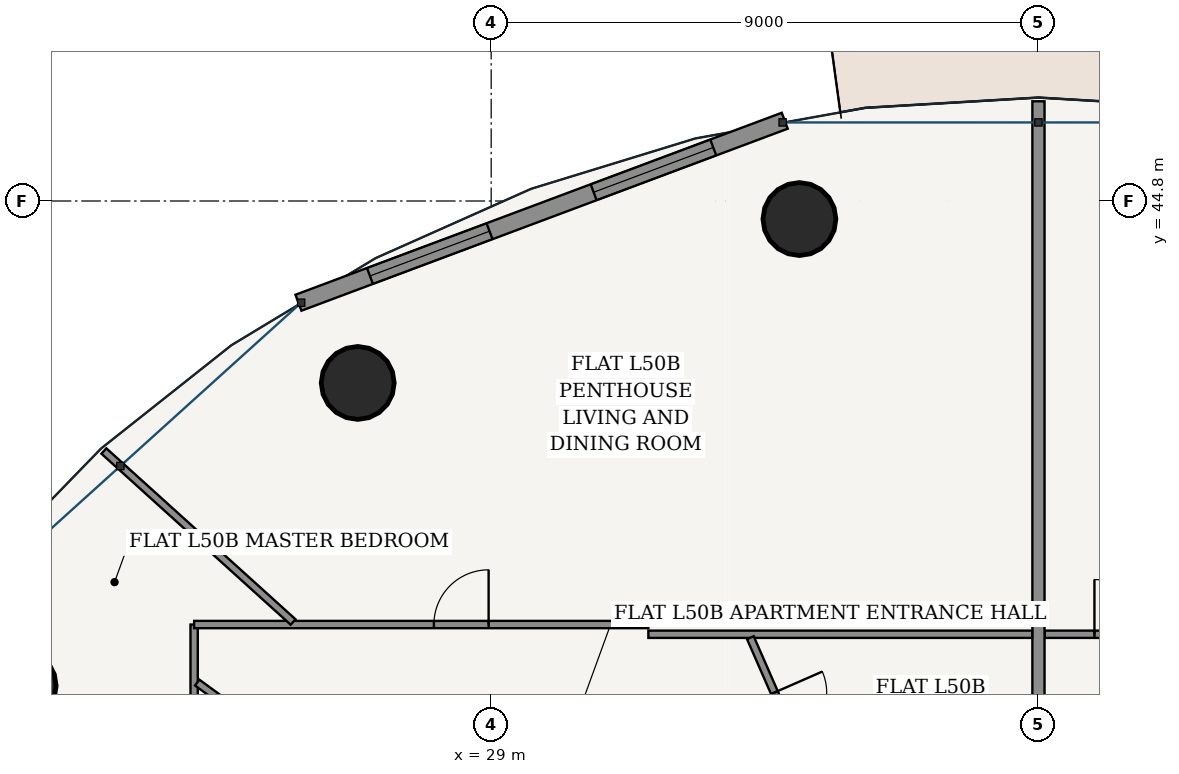
"""IFC4 building model, lengths in metres.
Left out: names, types, materials, properties, quantities, classifications, styles, units other than length and angle.
Written with IfcOpenShell. Run it as: python <this file> out.ifc"""

import sys

from ifc_helpers import new_model, si_unit, direction, frame, frame_2d, origin, origin_2d, place, context, subcontext, project, spatial, rectangle, hollow_circle, extrude, source, transform, mapped, element, fill, save


model = new_model("IFC4")
c1 = context("Model", 3, precision=1e-05, world=origin(), true_north=direction((-0.2419218956, 0.970295726276)))
c2 = subcontext(c1, "Body", "Model", "MODEL_VIEW")
j1 = project(units=[si_unit("LENGTHUNIT", "METRE"), si_unit("PLANEANGLEUNIT", "RADIAN")], contexts=[c1])
p1 = place(None, origin())
s1 = spatial("IfcSite", under=j1, at=p1, CompositionType="ELEMENT")
p2 = place(p1, origin())
s2 = spatial("IfcBuilding", under=s1, at=p2, CompositionType="ELEMENT")
p3 = place(p2, frame((0.0, 0.0, 191.2)))
s3 = spatial("IfcBuildingStorey", under=s2, at=p3, CompositionType="ELEMENT", Elevation=191.2)
for number, where, z_axis, x_axis in (
    (1, (34.069, 44.503, 0.0), (0.0, 0.0, 1.0), (1.0, 0.0, 0.0)),
    (2, (26.805, 41.808, 0.0), (0.0, 0.0, 1.0), (1.0, 0.0, 0.0)),
    (3, (21.246, 36.828, 0.0), (0.0, 0.0, 1.0), (1.0, 0.0, 0.0)),
):
    element("IfcColumn", number, at=place(p3, frame(where, z_axis=z_axis, x_axis=x_axis)), inside=s3, PredefinedType="COLUMN", context=c2, shape_type="SweptSolid", body=[
        extrude(hollow_circle(Radius=0.6, WallThickness=0.038, at=origin_2d()), origin(), (0.0, 0.0, 1.0), 3.7),
    ])
p4 = place(p3, frame((33.828, 46.12, 0.0), z_axis=(0.0, 0.0, 1.0), x_axis=(-0.936556918375, -0.350515532672, 0.0)))
e4 = element("IfcWall", 4, at=p4, inside=s3, PredefinedType="SOLIDWALL", context=c2, shape_type="SweptSolid", body=[
    extrude(rectangle(XDim=8.539, YDim=0.28, at=frame_2d((4.27, 0.0))), origin(), (0.0, 0.0, 1.0), 3.435),
])
p5 = place(p4, frame((1.256, 0.0, 0.85)))
e5 = element("IfcOpeningElement", 5, at=p5, cuts=e4, PredefinedType="OPENING", context=c2, shape_type="SweptSolid", body=[
    extrude(rectangle(XDim=2.1, YDim=1.95, at=frame_2d((1.05, 0.975))), frame((0.0, 0.15, 0.0), z_axis=(0.0, -1.0, 0.0), x_axis=(1.0, 0.0, 0.0)), (0.0, 0.0, 1.0), 0.3),
])
p6 = place(p4, frame((5.184, 0.0, 0.85)))
e6 = element("IfcOpeningElement", 6, at=p6, cuts=e4, PredefinedType="OPENING", context=c2, shape_type="SweptSolid", body=[
    extrude(rectangle(XDim=2.1, YDim=1.95, at=frame_2d((1.05, 0.975))), frame((0.0, 0.15, 0.0), z_axis=(0.0, -1.0, 0.0), x_axis=(1.0, 0.0, 0.0)), (0.0, 0.0, 1.0), 0.3),
])
p7 = place(p3, frame((38.102, 37.675, 0.0), z_axis=(0.0, 0.0, 1.0), x_axis=(1.0, 0.0, 0.0)))
e7 = element("IfcWall", 7, at=p7, inside=s3, PredefinedType="PARTITIONING", context=c2, shape_type="SweptSolid", body=[
    extrude(rectangle(XDim=6.313, YDim=0.12, at=frame_2d((3.156, 0.0))), origin(), (0.0, 0.0, 1.0), 2.951),
])
p8 = place(p7, frame((0.819, 0.0, 0.0)))
e8 = element("IfcOpeningElement", 8, at=p8, cuts=e7, PredefinedType="OPENING", context=c2, shape_type="SweptSolid", body=[
    extrude(rectangle(XDim=0.9, YDim=2.15, at=frame_2d((0.45, 1.075))), frame((0.0, 0.07, 0.0), z_axis=(0.0, -1.0, 0.0), x_axis=(1.0, 0.0, 0.0)), (0.0, 0.0, 1.0), 0.14),
])
p9 = place(p3, frame((38.0, 35.027, 0.0), z_axis=(0.0, 0.0, 1.0), x_axis=(0.0, 1.0, 0.0)))
e9 = element("IfcWall", 9, at=p9, inside=s3, PredefinedType="PARTITIONING", context=c2, shape_type="SweptSolid", body=[
    extrude(rectangle(XDim=11.413, YDim=0.2, at=frame_2d((5.707, 0.0))), origin(), (0.0, 0.0, 1.0), 2.52),
])
p10 = place(p3, frame((24.115, 24.406, 0.0), z_axis=(0.0, 0.0, 1.0), x_axis=(0.0, 1.0, 0.0)))
e10 = element("IfcWall", 10, at=p10, inside=s3, PredefinedType="PARTITIONING", context=c2, shape_type="SweptSolid", body=[
    extrude(rectangle(XDim=13.429, YDim=0.12, at=frame_2d((6.714, 0.0))), origin(), (0.0, 0.0, 1.0), 2.951),
])
p11 = place(p10, frame((9.641, 0.0, 0.0)))
e11 = element("IfcOpeningElement", 11, at=p11, cuts=e10, PredefinedType="OPENING", context=c2, shape_type="SweptSolid", body=[
    extrude(rectangle(XDim=0.9, YDim=2.15, at=frame_2d((0.45, 1.075))), frame((0.0, 0.07, 0.0), z_axis=(0.0, -1.0, 0.0), x_axis=(1.0, 0.0, 0.0)), (0.0, 0.0, 1.0), 0.14),
])
p12 = place(p3, frame((24.115, 37.835, 0.0), z_axis=(0.0, 0.0, 1.0), x_axis=(1.0, 0.0, 0.0)))
e12 = element("IfcWall", 12, at=p12, inside=s3, PredefinedType="PARTITIONING", context=c2, shape_type="SweptSolid", body=[
    extrude(rectangle(XDim=7.47, YDim=0.12, at=frame_2d((3.735, 0.0))), origin(), (0.0, 0.0, 1.0), 2.951),
])
p13 = place(p12, frame((3.943, 0.0, 0.0)))
e13 = element("IfcOpeningElement", 13, at=p13, cuts=e12, PredefinedType="OPENING", context=c2, shape_type="SweptSolid", body=[
    extrude(rectangle(XDim=0.9, YDim=2.15, at=frame_2d((0.45, 1.075))), frame((0.0, 0.07, 0.0), z_axis=(0.0, -1.0, 0.0), x_axis=(1.0, 0.0, 0.0)), (0.0, 0.0, 1.0), 0.14),
])
p14 = place(p3, frame((31.585, 37.675, 0.0), z_axis=(0.0, 0.0, 1.0), x_axis=(1.0, 0.0, 0.0)))
e14 = element("IfcWall", 14, at=p14, inside=s3, PredefinedType="PARTITIONING", context=c2, shape_type="SweptSolid", body=[
    extrude(rectangle(XDim=6.313, YDim=0.12, at=frame_2d((3.156, 0.0))), origin(), (0.0, 0.0, 1.0), 2.951),
])
p15 = place(p3, frame((25.743, 37.876, 0.0), z_axis=(0.0, 0.0, 1.0), x_axis=(-0.741943837234, 0.670462036502, 0.0)))
e15 = element("IfcWall", 15, at=p15, inside=s3, PredefinedType="PARTITIONING", context=c2, shape_type="SweptSolid", body=[
    extrude(rectangle(XDim=4.194, YDim=0.12, at=frame_2d((2.097, 0.0))), origin(), (0.0, 0.0, 1.0), 2.951),
])
p16 = place(p3, frame((34.397, 35.027, 0.0), z_axis=(0.0, 0.0, 1.0), x_axis=(-0.401135725485, 0.916018629581, 0.0)))
e16 = element("IfcWall", 16, at=p16, inside=s3, PredefinedType="PARTITIONING", context=c2, shape_type="SweptSolid", body=[
    extrude(rectangle(XDim=2.829, YDim=0.12, at=frame_2d((1.415, 0.0))), origin(), (0.0, 0.0, 1.0), 3.435),
])
p17 = place(p16, frame((0.985, 0.0, 0.0)))
e17 = element("IfcOpeningElement", 17, at=p17, cuts=e16, PredefinedType="OPENING", context=c2, shape_type="SweptSolid", body=[
    extrude(rectangle(XDim=0.86, YDim=2.15, at=frame_2d((0.43, 1.075))), frame((0.0, 0.07, 0.0), z_axis=(0.0, -1.0, 0.0), x_axis=(1.0, 0.0, 0.0)), (0.0, 0.0, 1.0), 0.14),
])
p18 = place(p3, frame((26.765, 34.986, 0.0), z_axis=(0.0, 0.0, 1.0), x_axis=(-0.808220499107, 0.588879974887, 0.0)))
e18 = element("IfcWall", 18, at=p18, inside=s3, PredefinedType="PARTITIONING", context=c2, shape_type="SweptSolid", body=[
    extrude(rectangle(XDim=3.217, YDim=0.12, at=frame_2d((1.608, 0.0))), origin(), (0.0, 0.0, 1.0), 3.11),
])
p19 = place(p18, frame((1.158, 0.0, 0.0)))
e19 = element("IfcOpeningElement", 19, at=p19, cuts=e18, PredefinedType="OPENING", context=c2, shape_type="SweptSolid", body=[
    extrude(rectangle(XDim=0.9, YDim=2.15, at=frame_2d((0.45, 1.075))), frame((0.0, 0.07, 0.0), z_axis=(0.0, -1.0, 0.0), x_axis=(1.0, 0.0, 0.0)), (0.0, 0.0, 1.0), 0.14),
])
m1 = source(origin(), c2, "Body", "SweptSolid", [
    extrude(rectangle(XDim=2.1, YDim=1.95, at=frame_2d((1.05, 0.975))), frame((0.0, 0.03, 0.0), z_axis=(0.0, -1.0, 0.0), x_axis=(1.0, 0.0, 0.0)), (0.0, 0.0, 1.0), 0.06),
])
p20 = place(p5, origin())
e20 = element("IfcWindow", 20, at=p20, inside=s3, PartitioningType="SINGLE_PANEL", PredefinedType="WINDOW", context=c2, shape_type="MappedRepresentation", body=[
    mapped(m1, transform((0.0, 0.0, 0.0), scale=1.0)),
])
fill(e5, e20)
p21 = place(p6, origin())
e21 = element("IfcWindow", 21, at=p21, inside=s3, PartitioningType="SINGLE_PANEL", PredefinedType="WINDOW", context=c2, shape_type="MappedRepresentation", body=[
    mapped(m1, transform((0.0, 0.0, 0.0), scale=1.0)),
])
fill(e6, e21)
m2 = source(origin(), c2, "Body", "SweptSolid", [
    extrude(rectangle(XDim=0.9, YDim=2.15, at=frame_2d((0.45, 1.075))), frame((0.0, 0.025, 0.0), z_axis=(0.0, -1.0, 0.0), x_axis=(1.0, 0.0, 0.0)), (0.0, 0.0, 1.0), 0.05),
])
p22 = place(p8, origin())
e22 = element("IfcDoor", 22, at=p22, inside=s3, OperationType="SINGLE_SWING_LEFT", PredefinedType="DOOR", context=c2, shape_type="MappedRepresentation", body=[
    mapped(m2, transform((0.0, 0.0, 0.0), scale=1.0)),
])
fill(e8, e22)
m3 = source(origin(), c2, "Body", "SweptSolid", [
    extrude(rectangle(XDim=0.86, YDim=2.15, at=frame_2d((0.43, 1.075))), frame((0.0, 0.025, 0.0), z_axis=(0.0, -1.0, 0.0), x_axis=(1.0, 0.0, 0.0)), (0.0, 0.0, 1.0), 0.05),
])
p23 = place(p17, frame((0.86, 0.0, 0.0), z_axis=(0.0, 0.0, 1.0), x_axis=(-1.0, 0.0, 0.0)))
e23 = element("IfcDoor", 23, at=p23, inside=s3, OperationType="SINGLE_SWING_LEFT", PredefinedType="DOOR", context=c2, shape_type="MappedRepresentation", body=[
    mapped(m3, transform((0.0, 0.0, 0.0), scale=1.0)),
])
fill(e17, e23)
p24 = place(p13, origin())
e24 = element("IfcDoor", 24, at=p24, inside=s3, OperationType="SINGLE_SWING_RIGHT", PredefinedType="DOOR", context=c2, shape_type="MappedRepresentation", body=[
    mapped(m2, transform((0.0, 0.0, 0.0), scale=1.0)),
])
fill(e13, e24)
save(model, sys.argv[1])
